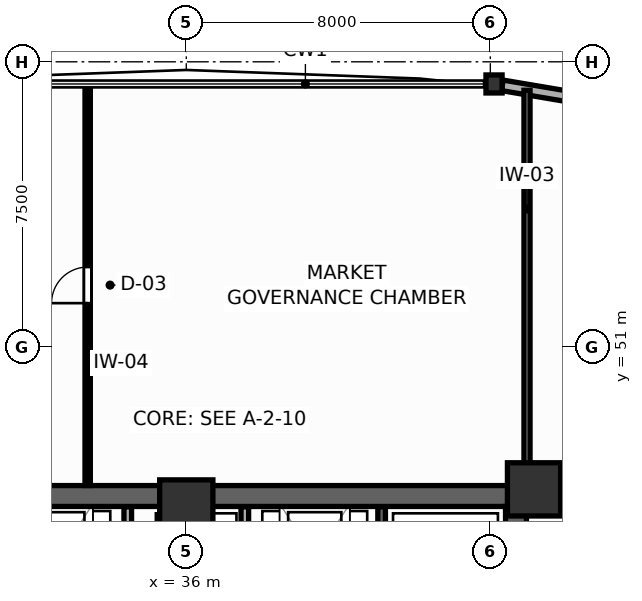
"""IFC4 building model, lengths in metres.
Left out: names, types, materials, properties, quantities, classifications, styles, units other than length and angle.
Written with IfcOpenShell. Run it as: python <this file> out.ifc"""

import sys

from ifc_helpers import new_model, si_unit, direction, frame, frame_2d, origin, origin_2d, place, context, subcontext, project, spatial, rectangle, i_section, extrude, source, transform, mapped, element, fill, save


model = new_model("IFC4")
c1 = context("Model", 3, precision=1e-05, world=origin(), true_north=direction((0.0, 1.0)))
c2 = subcontext(c1, "Body", "Model", "MODEL_VIEW")
j1 = project(units=[si_unit("LENGTHUNIT", "METRE"), si_unit("PLANEANGLEUNIT", "RADIAN")], contexts=[c1])
p1 = place(None, origin())
s1 = spatial("IfcSite", under=j1, at=p1, CompositionType="ELEMENT")
p2 = place(p1, origin())
s2 = spatial("IfcBuilding", under=s1, at=p2, CompositionType="ELEMENT")
p3 = place(p2, frame((0.0, 0.0, 31.8)))
s3 = spatial("IfcBuildingStorey", under=s2, at=p3, CompositionType="ELEMENT", Elevation=31.8)
p4 = place(p3, frame((27.05, 47.075, 0.0), z_axis=(0.0, 0.0, 1.0), x_axis=(1.0, 0.0, 0.0)))
e1 = element("IfcWall", 1, at=p4, inside=s3, PredefinedType="SHEAR", context=c2, shape_type="SweptSolid", body=[
    extrude(rectangle(XDim=17.9, YDim=0.55, at=frame_2d((8.95, 0.0))), origin(), (0.0, 0.0, 1.0), 3.9),
])
p5 = place(p3, frame((44.675, 37.8, 0.0), z_axis=(0.0, 0.0, 1.0), x_axis=(0.0, 1.0, 0.0)))
e2 = element("IfcWall", 2, at=p5, inside=s3, PredefinedType="SHEAR", context=c2, shape_type="SweptSolid", body=[
    extrude(rectangle(XDim=9.0, YDim=0.55, at=frame_2d((4.5, 0.0))), origin(), (0.0, 0.0, 1.0), 3.9),
])
m1 = source(origin(), c2, "Body", "SweptSolid", [
    extrude(rectangle(XDim=1.4, YDim=1.4, at=origin_2d()), origin(), (0.0, 0.0, 1.0), 3.9),
])
for number, where, z_axis, x_axis in (
    (3, (45.15, 47.25, 0.0), (0.0, 0.0, 1.0), (1.0, 0.0, 0.0)),
    (4, (36.0, 46.8, 0.0), (0.0, 0.0, 1.0), (1.0, 0.0, 0.0)),
):
    element("IfcColumn", number, at=place(p3, frame(where, z_axis=z_axis, x_axis=x_axis)), inside=s3, PredefinedType="COLUMN", context=c2, shape_type="MappedRepresentation", body=[
        mapped(m1, transform((0.0, 0.0, 0.0), scale=1.0)),
    ])
m2 = source(origin(), c2, "Body", "SweptSolid", [
    extrude(i_section(OverallWidth=0.424, OverallDepth=0.474, WebThickness=0.045, FlangeThickness=0.072, FilletRadius=0.015, at=origin_2d()), origin(), (0.0, 0.0, 1.0), 3.9),
])
p6 = place(p3, frame((44.097, 57.917, 0.0), z_axis=(0.0, 0.0, 1.0), x_axis=(1.0, 0.0, 0.0)))
e5 = element("IfcColumn", 5, at=p6, inside=s3, PredefinedType="COLUMN", context=c2, shape_type="MappedRepresentation", body=[
    mapped(m2, transform((0.0, 0.0, 0.0), scale=1.0)),
])
p7 = place(p3, frame((62.99, 54.726, 0.0), z_axis=(0.0, 0.0, 1.0), x_axis=(-0.98603202958, 0.166555806393, 0.0)))
e6 = element("IfcWall", 6, at=p7, inside=s3, PredefinedType="SOLIDWALL", context=c2, shape_type="SweptSolid", body=[
    extrude(rectangle(XDim=18.94, YDim=0.28, at=frame_2d((9.47, 0.0))), origin(), (0.0, 0.0, 1.0), 2.08),
])
p8 = place(p3, frame((41.14, 37.81, 0.0), z_axis=(0.0, 0.0, 1.0), x_axis=(0.0, 1.0, 0.0)))
e7 = element("IfcWall", 7, at=p8, inside=s3, PredefinedType="SHEAR", context=c2, shape_type="SweptSolid", body=[
    extrude(rectangle(XDim=8.98, YDim=0.2, at=frame_2d((4.49, 0.0))), origin(), (0.0, 0.0, 1.0), 3.9),
])
p9 = place(p8, frame((0.82, 0.0, 0.0)))
e8 = element("IfcOpeningElement", 8, at=p9, cuts=e7, PredefinedType="OPENING", context=c2, shape_type="SweptSolid", body=[
    extrude(rectangle(XDim=1.05, YDim=2.1, at=frame_2d((0.525, 1.05))), frame((0.0, 0.11, 0.0), z_axis=(0.0, -1.0, 0.0), x_axis=(1.0, 0.0, 0.0)), (0.0, 0.0, 1.0), 0.22),
])
p10 = place(p3, frame((34.46, 37.81, 0.0), z_axis=(0.0, 0.0, 1.0), x_axis=(0.0, 1.0, 0.0)))
e9 = element("IfcWall", 9, at=p10, inside=s3, PredefinedType="PARTITIONING", context=c2, shape_type="SweptSolid", body=[
    extrude(rectangle(XDim=8.98, YDim=0.2, at=frame_2d((4.49, 0.0))), origin(), (0.0, 0.0, 1.0), 3.68),
])
p11 = place(p10, frame((0.65, 0.0, 0.0)))
e10 = element("IfcOpeningElement", 10, at=p11, cuts=e9, PredefinedType="OPENING", context=c2, shape_type="SweptSolid", body=[
    extrude(rectangle(XDim=0.85, YDim=2.05, at=frame_2d((0.425, 1.025))), frame((0.0, 0.11, 0.0), z_axis=(0.0, -1.0, 0.0), x_axis=(1.0, 0.0, 0.0)), (0.0, 0.0, 1.0), 0.22),
])
p12 = place(p3, frame((37.54, 37.81, 0.0), z_axis=(0.0, 0.0, 1.0), x_axis=(0.0, 1.0, 0.0)))
e11 = element("IfcWall", 11, at=p12, inside=s3, PredefinedType="PARTITIONING", context=c2, shape_type="SweptSolid", body=[
    extrude(rectangle(XDim=8.98, YDim=0.2, at=frame_2d((4.49, 0.0))), origin(), (0.0, 0.0, 1.0), 3.68),
])
p13 = place(p12, frame((0.65, 0.0, 0.0)))
e12 = element("IfcOpeningElement", 12, at=p13, cuts=e11, PredefinedType="OPENING", context=c2, shape_type="SweptSolid", body=[
    extrude(rectangle(XDim=0.85, YDim=2.05, at=frame_2d((0.425, 1.025))), frame((0.0, 0.11, 0.0), z_axis=(0.0, -1.0, 0.0), x_axis=(1.0, 0.0, 0.0)), (0.0, 0.0, 1.0), 0.22),
])
p14 = place(p3, frame((44.965, 47.34, 0.0), z_axis=(0.0, 0.0, 1.0), x_axis=(0.0, 1.0, 0.0)))
e13 = element("IfcWall", 13, at=p14, inside=s3, PredefinedType="PARTITIONING", context=c2, shape_type="SweptSolid", body=[
    extrude(rectangle(XDim=10.41, YDim=0.16, at=frame_2d((5.205, 0.0))), origin(), (0.0, 0.0, 1.0), 2.24),
])
p15 = place(p3, frame((33.405, 47.352, 0.0), z_axis=(0.0, 0.0, 1.0), x_axis=(0.0, 1.0, 0.0)))
e14 = element("IfcWall", 14, at=p15, inside=s3, PredefinedType="PARTITIONING", context=c2, shape_type="SweptSolid", body=[
    extrude(rectangle(XDim=10.545, YDim=0.14, at=frame_2d((5.272, 0.0))), origin(), (0.0, 0.0, 1.0), 3.68),
])
p16 = place(p15, frame((4.798, 0.0, 0.0)))
e15 = element("IfcOpeningElement", 15, at=p16, cuts=e14, PredefinedType="OPENING", context=c2, shape_type="SweptSolid", body=[
    extrude(rectangle(XDim=0.95, YDim=2.05, at=frame_2d((0.475, 1.025))), frame((0.0, 0.08, 0.0), z_axis=(0.0, -1.0, 0.0), x_axis=(1.0, 0.0, 0.0)), (0.0, 0.0, 1.0), 0.16),
])
p17 = place(p16, origin())
e16 = element("IfcDoor", 16, at=p17, inside=s3, OperationType="SINGLE_SWING_LEFT", PredefinedType="DOOR", context=c2, shape_type="SweptSolid", body=[
    extrude(rectangle(XDim=0.95, YDim=2.05, at=frame_2d((0.475, 1.025))), frame((0.0, 0.025, 0.0), z_axis=(0.0, -1.0, 0.0), x_axis=(1.0, 0.0, 0.0)), (0.0, 0.0, 1.0), 0.05),
])
fill(e15, e16)
save(model, sys.argv[1])
